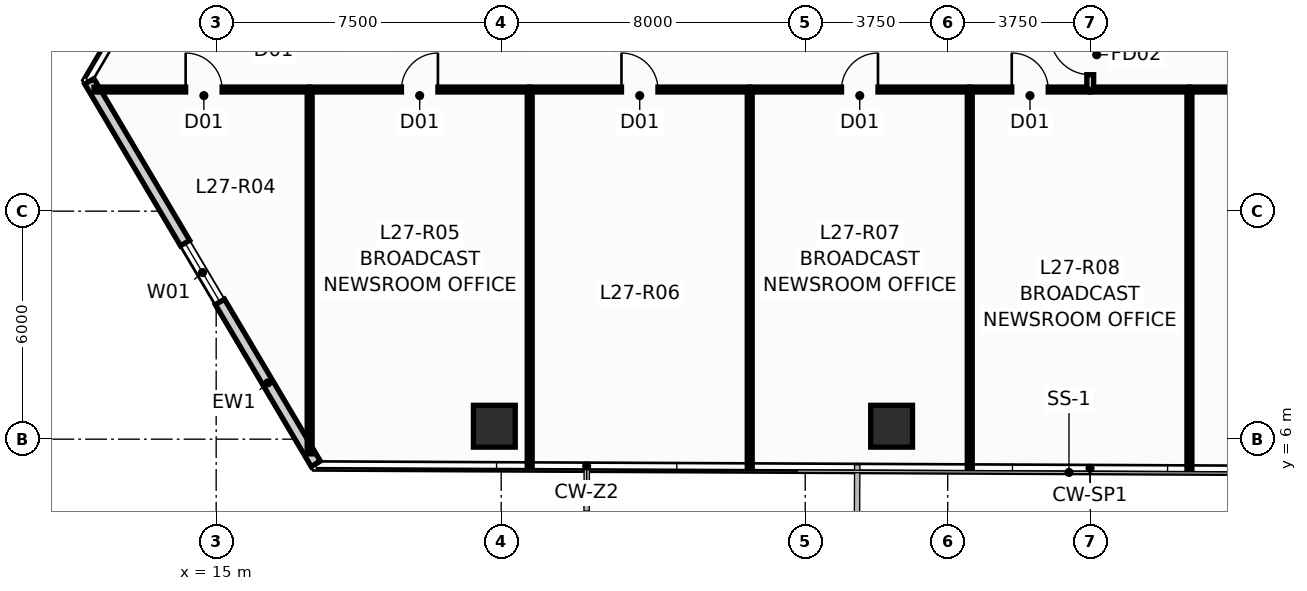
"""IFC4 building model, lengths in metres.
Left out: names, types, materials, properties, quantities, classifications, styles, units other than length and angle.
Written with IfcOpenShell. Run it as: python <this file> out.ifc"""

import sys

from ifc_helpers import new_model, si_unit, direction, frame, frame_2d, origin, origin_2d, place, context, subcontext, project, spatial, rectangle, hollow_rectangle, extrude, source, transform, mapped, element, fill, save


model = new_model("IFC4")
c1 = context("Model", 3, precision=1e-05, world=origin(), true_north=direction((0.0, 1.0)))
c2 = subcontext(c1, "Body", "Model", "MODEL_VIEW")
j1 = project(units=[si_unit("LENGTHUNIT", "METRE"), si_unit("PLANEANGLEUNIT", "RADIAN")], contexts=[c1])
p1 = place(None, origin())
s1 = spatial("IfcSite", under=j1, at=p1, CompositionType="ELEMENT")
p2 = place(p1, origin())
s2 = spatial("IfcBuilding", under=s1, at=p2, CompositionType="ELEMENT")
p3 = place(p2, frame((0.0, 0.0, 105.4)))
s3 = spatial("IfcBuildingStorey", under=s2, at=p3, CompositionType="ELEMENT", Elevation=105.4)
m1 = source(origin(), c2, "Body", "SweptSolid", [
    extrude(hollow_rectangle(XDim=1.1, YDim=1.1, WallThickness=0.06, at=origin_2d()), origin(), (0.0, 0.0, 1.0), 3.651),
])
p4 = place(p3, frame((22.32, 6.341, 0.0), z_axis=(-0.013440068782, 0.019792340097, 0.999713772949), x_axis=(-0.827290216258, -0.561774775229, 0.0)))
e1 = element("IfcColumn", 1, at=p4, inside=s3, PredefinedType="COLUMN", context=c2, shape_type="MappedRepresentation", body=[
    mapped(m1, transform((0.0, 0.0, 0.0), scale=1.0)),
])
m2 = source(origin(), c2, "Body", "SweptSolid", [
    extrude(hollow_rectangle(XDim=1.1, YDim=1.1, WallThickness=0.06, at=origin_2d()), origin(), (0.0, 0.0, 1.0), 3.651),
])
p5 = place(p3, frame((32.773, 6.341, 0.0), z_axis=(-0.004480382638, 0.019793929266, 0.999794042058), x_axis=(-0.975326687046, -0.220766513622, 0.0)))
e2 = element("IfcColumn", 2, at=p5, inside=s3, PredefinedType="COLUMN", context=c2, shape_type="MappedRepresentation", body=[
    mapped(m2, transform((0.0, 0.0, 0.0), scale=1.0)),
])
p6 = place(p3, frame((17.621, 5.352, 0.0), z_axis=(0.0, 0.0, 1.0), x_axis=(-0.509467601266, 0.860489839138, 0.0)))
e3 = element("IfcWall", 3, at=p6, inside=s3, PredefinedType="STANDARD", context=c2, shape_type="SweptSolid", body=[
    extrude(rectangle(XDim=11.695, YDim=0.28, at=frame_2d((5.848, 0.0))), origin(), (0.0, 0.0, 1.0), 3.4),
])
p7 = place(p6, frame((4.95, 0.0, 0.9)))
e4 = element("IfcOpeningElement", 4, at=p7, cuts=e3, PredefinedType="OPENING", context=c2, shape_type="SweptSolid", body=[
    extrude(rectangle(XDim=1.8, YDim=1.8, at=frame_2d((0.9, 0.9))), frame((0.0, 0.152, 0.0), z_axis=(0.0, -1.0, 0.0), x_axis=(1.0, 0.0, 0.0)), (0.0, 0.0, 1.0), 0.304),
])
p8 = place(p3, frame((40.61, 5.216, 0.0), z_axis=(0.0, 0.0, 1.0), x_axis=(0.0, 1.0, 0.0)))
e5 = element("IfcWall", 5, at=p8, inside=s3, PredefinedType="PARTITIONING", context=c2, shape_type="SweptSolid", body=[
    extrude(rectangle(XDim=9.979, YDim=0.13, at=frame_2d((4.99, 0.0))), origin(), (0.0, 0.0, 1.0), 3.4),
])
p9 = place(p3, frame((34.83, 5.242, 0.0), z_axis=(0.0, 0.0, 1.0), x_axis=(0.0, 1.0, 0.0)))
e6 = element("IfcWall", 6, at=p9, inside=s3, PredefinedType="PARTITIONING", context=c2, shape_type="SweptSolid", body=[
    extrude(rectangle(XDim=9.953, YDim=0.13, at=frame_2d((4.977, 0.0))), origin(), (0.0, 0.0, 1.0), 3.4),
])
p10 = place(p3, frame((29.04, 5.268, 0.0), z_axis=(0.0, 0.0, 1.0), x_axis=(0.0, 1.0, 0.0)))
e7 = element("IfcWall", 7, at=p10, inside=s3, PredefinedType="PARTITIONING", context=c2, shape_type="SweptSolid", body=[
    extrude(rectangle(XDim=9.927, YDim=0.13, at=frame_2d((4.963, 0.0))), origin(), (0.0, 0.0, 1.0), 3.4),
])
p11 = place(p3, frame((23.25, 5.295, 0.0), z_axis=(0.0, 0.0, 1.0), x_axis=(0.0, 1.0, 0.0)))
e8 = element("IfcWall", 8, at=p11, inside=s3, PredefinedType="PARTITIONING", context=c2, shape_type="SweptSolid", body=[
    extrude(rectangle(XDim=9.9, YDim=0.13, at=frame_2d((4.95, 0.0))), origin(), (0.0, 0.0, 1.0), 3.4),
])
p12 = place(p3, frame((17.46, 5.613, 0.0), z_axis=(0.0, 0.0, 1.0), x_axis=(0.0, 1.0, 0.0)))
e9 = element("IfcWall", 9, at=p12, inside=s3, PredefinedType="PARTITIONING", context=c2, shape_type="SweptSolid", body=[
    extrude(rectangle(XDim=9.582, YDim=0.13, at=frame_2d((4.791, 0.0))), origin(), (0.0, 0.0, 1.0), 3.4),
])
p13 = place(p3, frame((11.784, 15.2, 0.0), z_axis=(0.0, 0.0, 1.0), x_axis=(1.0, 0.0, 0.0)))
e10 = element("IfcWall", 10, at=p13, inside=s3, PredefinedType="PARTITIONING", context=c2, shape_type="SweptSolid", body=[
    extrude(rectangle(XDim=5.671, YDim=0.13, at=frame_2d((2.835, 0.0))), origin(), (0.0, 0.0, 1.0), 3.4),
])
p14 = place(p13, frame((2.412, 0.0, 0.0)))
e11 = element("IfcOpeningElement", 11, at=p14, cuts=e10, PredefinedType="OPENING", context=c2, shape_type="SweptSolid", body=[
    extrude(rectangle(XDim=0.96, YDim=2.15, at=frame_2d((0.48, 1.075))), frame((0.0, 0.077, 0.0), z_axis=(0.0, -1.0, 0.0), x_axis=(1.0, 0.0, 0.0)), (0.0, 0.0, 1.0), 0.154),
])
p15 = place(p3, frame((29.045, 15.2, 0.0), z_axis=(0.0, 0.0, 1.0), x_axis=(1.0, 0.0, 0.0)))
e12 = element("IfcWall", 12, at=p15, inside=s3, PredefinedType="PARTITIONING", context=c2, shape_type="SweptSolid", body=[
    extrude(rectangle(XDim=5.78, YDim=0.13, at=frame_2d((2.89, 0.0))), origin(), (0.0, 0.0, 1.0), 3.4),
])
p16 = place(p15, frame((2.41, 0.0, 0.0)))
e13 = element("IfcOpeningElement", 13, at=p16, cuts=e12, PredefinedType="OPENING", context=c2, shape_type="SweptSolid", body=[
    extrude(rectangle(XDim=0.96, YDim=2.15, at=frame_2d((0.48, 1.075))), frame((0.0, 0.077, 0.0), z_axis=(0.0, -1.0, 0.0), x_axis=(1.0, 0.0, 0.0)), (0.0, 0.0, 1.0), 0.154),
])
p17 = place(p3, frame((23.255, 15.2, 0.0), z_axis=(0.0, 0.0, 1.0), x_axis=(1.0, 0.0, 0.0)))
e14 = element("IfcWall", 14, at=p17, inside=s3, PredefinedType="PARTITIONING", context=c2, shape_type="SweptSolid", body=[
    extrude(rectangle(XDim=5.78, YDim=0.13, at=frame_2d((2.89, 0.0))), origin(), (0.0, 0.0, 1.0), 3.4),
])
p18 = place(p17, frame((2.41, 0.0, 0.0)))
e15 = element("IfcOpeningElement", 15, at=p18, cuts=e14, PredefinedType="OPENING", context=c2, shape_type="SweptSolid", body=[
    extrude(rectangle(XDim=0.96, YDim=2.15, at=frame_2d((0.48, 1.075))), frame((0.0, 0.077, 0.0), z_axis=(0.0, -1.0, 0.0), x_axis=(1.0, 0.0, 0.0)), (0.0, 0.0, 1.0), 0.154),
])
p19 = place(p3, frame((17.465, 15.2, 0.0), z_axis=(0.0, 0.0, 1.0), x_axis=(1.0, 0.0, 0.0)))
e16 = element("IfcWall", 16, at=p19, inside=s3, PredefinedType="PARTITIONING", context=c2, shape_type="SweptSolid", body=[
    extrude(rectangle(XDim=5.78, YDim=0.13, at=frame_2d((2.89, 0.0))), origin(), (0.0, 0.0, 1.0), 3.4),
])
p20 = place(p19, frame((2.41, 0.0, 0.0)))
e17 = element("IfcOpeningElement", 17, at=p20, cuts=e16, PredefinedType="OPENING", context=c2, shape_type="SweptSolid", body=[
    extrude(rectangle(XDim=0.96, YDim=2.15, at=frame_2d((0.48, 1.075))), frame((0.0, 0.077, 0.0), z_axis=(0.0, -1.0, 0.0), x_axis=(1.0, 0.0, 0.0)), (0.0, 0.0, 1.0), 0.154),
])
p21 = place(p3, frame((40.615, 15.2, 0.0), z_axis=(0.0, 0.0, 1.0), x_axis=(1.0, 0.0, 0.0)))
e18 = element("IfcWall", 18, at=p21, inside=s3, PredefinedType="PARTITIONING", context=c2, shape_type="SweptSolid", body=[
    extrude(rectangle(XDim=5.78, YDim=0.13, at=frame_2d((2.89, 0.0))), origin(), (0.0, 0.0, 1.0), 3.4),
])
p22 = place(p21, frame((2.41, 0.0, 0.0)))
e19 = element("IfcOpeningElement", 19, at=p22, cuts=e18, PredefinedType="OPENING", context=c2, shape_type="SweptSolid", body=[
    extrude(rectangle(XDim=0.96, YDim=2.15, at=frame_2d((0.48, 1.075))), frame((0.0, 0.077, 0.0), z_axis=(0.0, -1.0, 0.0), x_axis=(1.0, 0.0, 0.0)), (0.0, 0.0, 1.0), 0.154),
])
p23 = place(p3, frame((34.835, 15.2, 0.0), z_axis=(0.0, 0.0, 1.0), x_axis=(1.0, 0.0, 0.0)))
e20 = element("IfcWall", 20, at=p23, inside=s3, PredefinedType="PARTITIONING", context=c2, shape_type="SweptSolid", body=[
    extrude(rectangle(XDim=3.16, YDim=0.13, at=frame_2d((1.58, 0.0))), origin(), (0.0, 0.0, 1.0), 3.4),
])
p24 = place(p23, frame((1.1, 0.0, 0.0)))
e21 = element("IfcOpeningElement", 21, at=p24, cuts=e20, PredefinedType="OPENING", context=c2, shape_type="SweptSolid", body=[
    extrude(rectangle(XDim=0.96, YDim=2.15, at=frame_2d((0.48, 1.075))), frame((0.0, 0.077, 0.0), z_axis=(0.0, -1.0, 0.0), x_axis=(1.0, 0.0, 0.0)), (0.0, 0.0, 1.0), 0.154),
])
p25 = place(p3, frame((38.005, 15.2, 0.0), z_axis=(0.0, 0.0, 1.0), x_axis=(1.0, 0.0, 0.0)))
e22 = element("IfcWall", 22, at=p25, inside=s3, PredefinedType="PARTITIONING", context=c2, shape_type="SweptSolid", body=[
    extrude(rectangle(XDim=2.6, YDim=0.13, at=frame_2d((1.3, 0.0))), origin(), (0.0, 0.0, 1.0), 3.4),
])
p26 = place(p3, frame((38.0, 15.205, 0.0), z_axis=(0.0, 0.0, 1.0), x_axis=(0.0, 1.0, 0.0)))
e23 = element("IfcWall", 23, at=p26, inside=s3, PredefinedType="PARTITIONING", context=c2, shape_type="SweptSolid", body=[
    extrude(rectangle(XDim=1.82, YDim=0.18, at=frame_2d((0.91, 0.0))), origin(), (0.0, 0.0, 1.0), 3.4),
])
p27 = place(p26, frame((0.385, 0.0, 0.0)))
e24 = element("IfcOpeningElement", 24, at=p27, cuts=e23, PredefinedType="OPENING", context=c2, shape_type="SweptSolid", body=[
    extrude(rectangle(XDim=1.05, YDim=2.15, at=frame_2d((0.525, 1.075))), frame((0.0, 0.102, 0.0), z_axis=(0.0, -1.0, 0.0), x_axis=(1.0, 0.0, 0.0)), (0.0, 0.0, 1.0), 0.204),
])
p28 = place(p7, origin())
e25 = element("IfcWindow", 25, at=p28, inside=s3, PartitioningType="SINGLE_PANEL", PredefinedType="WINDOW", context=c2, shape_type="SweptSolid", body=[
    extrude(rectangle(XDim=1.8, YDim=1.8, at=frame_2d((0.9, 0.9))), frame((0.0, 0.03, 0.0), z_axis=(0.0, -1.0, 0.0), x_axis=(1.0, 0.0, 0.0)), (0.0, 0.0, 1.0), 0.06),
])
fill(e4, e25)
p29 = place(p14, origin())
e26 = element("IfcDoor", 26, at=p29, inside=s3, OperationType="SINGLE_SWING_LEFT", PredefinedType="DOOR", context=c2, shape_type="SweptSolid", body=[
    extrude(rectangle(XDim=0.96, YDim=2.15, at=frame_2d((0.48, 1.075))), frame((0.0, 0.025, 0.0), z_axis=(0.0, -1.0, 0.0), x_axis=(1.0, 0.0, 0.0)), (0.0, 0.0, 1.0), 0.05),
])
fill(e11, e26)
p30 = place(p16, origin())
e27 = element("IfcDoor", 27, at=p30, inside=s3, OperationType="SINGLE_SWING_RIGHT", PredefinedType="DOOR", context=c2, shape_type="SweptSolid", body=[
    extrude(rectangle(XDim=0.96, YDim=2.15, at=frame_2d((0.48, 1.075))), frame((0.0, 0.025, 0.0), z_axis=(0.0, -1.0, 0.0), x_axis=(1.0, 0.0, 0.0)), (0.0, 0.0, 1.0), 0.05),
])
fill(e13, e27)
p31 = place(p18, origin())
e28 = element("IfcDoor", 28, at=p31, inside=s3, OperationType="SINGLE_SWING_LEFT", PredefinedType="DOOR", context=c2, shape_type="SweptSolid", body=[
    extrude(rectangle(XDim=0.96, YDim=2.15, at=frame_2d((0.48, 1.075))), frame((0.0, 0.025, 0.0), z_axis=(0.0, -1.0, 0.0), x_axis=(1.0, 0.0, 0.0)), (0.0, 0.0, 1.0), 0.05),
])
fill(e15, e28)
p32 = place(p20, origin())
e29 = element("IfcDoor", 29, at=p32, inside=s3, OperationType="SINGLE_SWING_RIGHT", PredefinedType="DOOR", context=c2, shape_type="SweptSolid", body=[
    extrude(rectangle(XDim=0.96, YDim=2.15, at=frame_2d((0.48, 1.075))), frame((0.0, 0.025, 0.0), z_axis=(0.0, -1.0, 0.0), x_axis=(1.0, 0.0, 0.0)), (0.0, 0.0, 1.0), 0.05),
])
fill(e17, e29)
p33 = place(p24, origin())
e30 = element("IfcDoor", 30, at=p33, inside=s3, OperationType="SINGLE_SWING_LEFT", PredefinedType="DOOR", context=c2, shape_type="SweptSolid", body=[
    extrude(rectangle(XDim=0.96, YDim=2.15, at=frame_2d((0.48, 1.075))), frame((0.0, 0.025, 0.0), z_axis=(0.0, -1.0, 0.0), x_axis=(1.0, 0.0, 0.0)), (0.0, 0.0, 1.0), 0.05),
])
fill(e21, e30)
p34 = place(p27, origin())
e31 = element("IfcDoor", 31, at=p34, inside=s3, OperationType="SINGLE_SWING_RIGHT", PredefinedType="DOOR", context=c2, shape_type="SweptSolid", body=[
    extrude(rectangle(XDim=1.05, YDim=2.15, at=frame_2d((0.525, 1.075))), frame((0.0, 0.025, 0.0), z_axis=(0.0, -1.0, 0.0), x_axis=(1.0, 0.0, 0.0)), (0.0, 0.0, 1.0), 0.05),
])
fill(e24, e31)
save(model, sys.argv[1])
